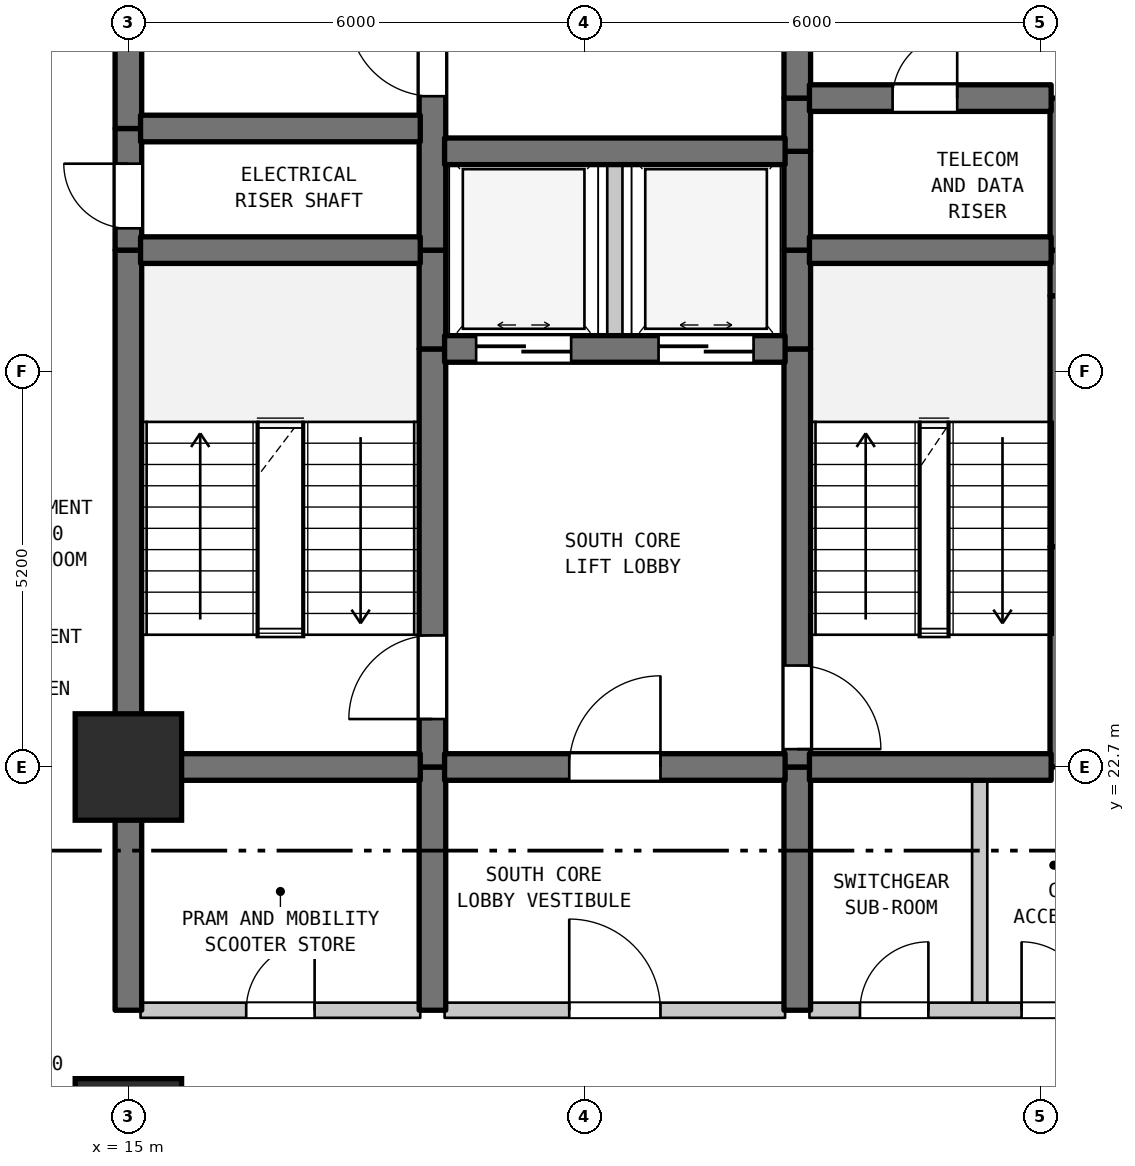
"""IFC4 building model, lengths in metres.
Left out: names, types, materials, properties, quantities, classifications, styles, units other than length and angle.
Written with IfcOpenShell. Run it as: python <this file> out.ifc"""

import sys

from ifc_helpers import new_model, si_unit, direction, frame, frame_2d, origin, origin_2d, place, context, subcontext, project, spatial, rectangle, extrude, element, fill, save


model = new_model("IFC4")
c1 = context("Model", 3, precision=1e-05, world=origin(), true_north=direction((0.0, 1.0)))
c2 = subcontext(c1, "Body", "Model", "MODEL_VIEW")
j1 = project(units=[si_unit("LENGTHUNIT", "METRE"), si_unit("PLANEANGLEUNIT", "RADIAN")], contexts=[c1])
p1 = place(None, origin())
s1 = spatial("IfcSite", under=j1, at=p1, CompositionType="ELEMENT")
p2 = place(p1, origin())
s2 = spatial("IfcBuilding", under=s1, at=p2, CompositionType="ELEMENT")
p3 = place(p2, frame((0.0, 0.0, 49.9)))
s3 = spatial("IfcBuildingStorey", under=s2, at=p3, CompositionType="ELEMENT", Elevation=49.9)
for number, where, z_axis, x_axis in (
    (1, (15.0, 17.9, 0.0), (0.0, 0.0, 1.0), (1.0, 0.0, 0.0)),
    (2, (15.0, 22.7, 0.0), (0.0, 0.0, 1.0), (1.0, 0.0, 0.0)),
):
    element("IfcColumn", number, at=place(p3, frame(where, z_axis=z_axis, x_axis=x_axis)), inside=s3, PredefinedType="COLUMN", context=c2, shape_type="SweptSolid", body=[
        extrude(rectangle(XDim=1.4, YDim=1.4, at=origin_2d()), origin(), (0.0, 0.0, 1.0), 3.7),
    ])
p4 = place(p3, frame((15.0, 19.5, 0.0), z_axis=(0.0, 0.0, 1.0), x_axis=(0.0, 1.0, 0.0)))
e3 = element("IfcWall", 3, at=p4, inside=s3, PredefinedType="SHEAR", context=c2, shape_type="SweptSolid", body=[
    extrude(rectangle(XDim=3.2, YDim=0.35, at=frame_2d((1.6, 0.0))), origin(), (0.0, 0.0, 1.0), 3.385),
])
p5 = place(p3, frame((15.0, 22.7, 0.0), z_axis=(0.0, 0.0, 1.0), x_axis=(0.0, 1.0, 0.0)))
e4 = element("IfcWall", 4, at=p5, inside=s3, PredefinedType="SHEAR", context=c2, shape_type="SweptSolid", body=[
    extrude(rectangle(XDim=6.8, YDim=0.35, at=frame_2d((3.4, 0.0))), origin(), (0.0, 0.0, 1.0), 3.385),
])
p6 = place(p3, frame((15.0, 29.5, 0.0), z_axis=(0.0, 0.0, 1.0), x_axis=(0.0, 1.0, 0.0)))
e5 = element("IfcWall", 5, at=p6, inside=s3, PredefinedType="SHEAR", context=c2, shape_type="SweptSolid", body=[
    extrude(rectangle(XDim=1.6, YDim=0.35, at=frame_2d((0.8, 0.0))), origin(), (0.0, 0.0, 1.0), 3.385),
])
p7 = place(p6, frame((0.287, 0.0, 0.0)))
e6 = element("IfcOpeningElement", 6, at=p7, cuts=e5, PredefinedType="OPENING", context=c2, shape_type="SweptSolid", body=[
    extrude(rectangle(XDim=0.85, YDim=2.1, at=frame_2d((0.425, 1.05))), frame((0.0, 0.185, 0.0), z_axis=(0.0, -1.0, 0.0), x_axis=(1.0, 0.0, 0.0)), (0.0, 0.0, 1.0), 0.37),
])
p8 = place(p3, frame((15.0, 31.1, 0.0), z_axis=(0.0, 0.0, 1.0), x_axis=(0.0, 1.0, 0.0)))
e7 = element("IfcWall", 7, at=p8, inside=s3, PredefinedType="SHEAR", context=c2, shape_type="SweptSolid", body=[
    extrude(rectangle(XDim=6.8, YDim=0.35, at=frame_2d((3.4, 0.0))), origin(), (0.0, 0.0, 1.0), 3.385),
])
p9 = place(p3, frame((19.0, 19.5, 0.0), z_axis=(0.0, 0.0, 1.0), x_axis=(0.0, 1.0, 0.0)))
e8 = element("IfcWall", 8, at=p9, inside=s3, PredefinedType="SHEAR", context=c2, shape_type="SweptSolid", body=[
    extrude(rectangle(XDim=3.2, YDim=0.35, at=frame_2d((1.6, 0.0))), origin(), (0.0, 0.0, 1.0), 3.385),
])
p10 = place(p3, frame((19.0, 22.7, 0.0), z_axis=(0.0, 0.0, 1.0), x_axis=(0.0, 1.0, 0.0)))
e9 = element("IfcWall", 9, at=p10, inside=s3, PredefinedType="SHEAR", context=c2, shape_type="SweptSolid", body=[
    extrude(rectangle(XDim=5.5, YDim=0.35, at=frame_2d((2.75, 0.0))), origin(), (0.0, 0.0, 1.0), 3.385),
])
p11 = place(p10, frame((0.631, 0.0, 0.0)))
e10 = element("IfcOpeningElement", 10, at=p11, cuts=e9, PredefinedType="OPENING", context=c2, shape_type="SweptSolid", body=[
    extrude(rectangle(XDim=1.1, YDim=2.15, at=frame_2d((0.55, 1.075))), frame((0.0, 0.185, 0.0), z_axis=(0.0, -1.0, 0.0), x_axis=(1.0, 0.0, 0.0)), (0.0, 0.0, 1.0), 0.37),
])
p12 = place(p3, frame((19.0, 28.2, 0.0), z_axis=(0.0, 0.0, 1.0), x_axis=(0.0, 1.0, 0.0)))
e11 = element("IfcWall", 11, at=p12, inside=s3, PredefinedType="SHEAR", context=c2, shape_type="SweptSolid", body=[
    extrude(rectangle(XDim=1.3, YDim=0.35, at=frame_2d((0.65, 0.0))), origin(), (0.0, 0.0, 1.0), 3.385),
])
p13 = place(p3, frame((19.0, 29.5, 0.0), z_axis=(0.0, 0.0, 1.0), x_axis=(0.0, 1.0, 0.0)))
e12 = element("IfcWall", 12, at=p13, inside=s3, PredefinedType="SHEAR", context=c2, shape_type="SweptSolid", body=[
    extrude(rectangle(XDim=5.5, YDim=0.35, at=frame_2d((2.75, 0.0))), origin(), (0.0, 0.0, 1.0), 3.385),
])
p14 = place(p13, frame((2.025, 0.0, 0.0)))
e13 = element("IfcOpeningElement", 13, at=p14, cuts=e12, PredefinedType="OPENING", context=c2, shape_type="SweptSolid", body=[
    extrude(rectangle(XDim=1.1, YDim=2.15, at=frame_2d((0.55, 1.075))), frame((0.0, 0.185, 0.0), z_axis=(0.0, -1.0, 0.0), x_axis=(1.0, 0.0, 0.0)), (0.0, 0.0, 1.0), 0.37),
])
p15 = place(p3, frame((21.4, 28.2, 0.0), z_axis=(0.0, 0.0, 1.0), x_axis=(0.0, 1.0, 0.0)))
e14 = element("IfcWall", 14, at=p15, inside=s3, PredefinedType="STANDARD", context=c2, shape_type="SweptSolid", body=[
    extrude(rectangle(XDim=2.6, YDim=0.2, at=frame_2d((1.3, 0.0))), origin(), (0.0, 0.0, 1.0), 3.385),
])
p16 = place(p3, frame((23.8, 19.5, 0.0), z_axis=(0.0, 0.0, 1.0), x_axis=(0.0, 1.0, 0.0)))
e15 = element("IfcWall", 15, at=p16, inside=s3, PredefinedType="SHEAR", context=c2, shape_type="SweptSolid", body=[
    extrude(rectangle(XDim=3.2, YDim=0.35, at=frame_2d((1.6, 0.0))), origin(), (0.0, 0.0, 1.0), 3.385),
])
p17 = place(p3, frame((23.8, 22.7, 0.0), z_axis=(0.0, 0.0, 1.0), x_axis=(0.0, 1.0, 0.0)))
e16 = element("IfcWall", 16, at=p17, inside=s3, PredefinedType="SHEAR", context=c2, shape_type="SweptSolid", body=[
    extrude(rectangle(XDim=5.5, YDim=0.35, at=frame_2d((2.75, 0.0))), origin(), (0.0, 0.0, 1.0), 3.385),
])
p18 = place(p17, frame((0.235, 0.0, 0.0)))
e17 = element("IfcOpeningElement", 17, at=p18, cuts=e16, PredefinedType="OPENING", context=c2, shape_type="SweptSolid", body=[
    extrude(rectangle(XDim=1.1, YDim=2.15, at=frame_2d((0.55, 1.075))), frame((0.0, 0.185, 0.0), z_axis=(0.0, -1.0, 0.0), x_axis=(1.0, 0.0, 0.0)), (0.0, 0.0, 1.0), 0.37),
])
for number, where, z_axis, x_axis in (
    (18, (23.8, 28.2, 0.0), (0.0, 0.0, 1.0), (0.0, 1.0, 0.0)),
    (19, (23.8, 29.5, 0.0), (0.0, 0.0, 1.0), (0.0, 1.0, 0.0)),
):
    element("IfcWall", number, at=place(p3, frame(where, z_axis=z_axis, x_axis=x_axis)), inside=s3, PredefinedType="SHEAR", context=c2, shape_type="SweptSolid", body=[
        extrude(rectangle(XDim=1.3, YDim=0.35, at=frame_2d((0.65, 0.0))), origin(), (0.0, 0.0, 1.0), 3.385),
    ])
p19 = place(p3, frame((23.8, 30.8, 0.0), z_axis=(0.0, 0.0, 1.0), x_axis=(0.0, 1.0, 0.0)))
e20 = element("IfcWall", 20, at=p19, inside=s3, PredefinedType="SHEAR", context=c2, shape_type="SweptSolid", body=[
    extrude(rectangle(XDim=0.7, YDim=0.35, at=frame_2d((0.35, 0.0))), origin(), (0.0, 0.0, 1.0), 3.385),
])
p20 = place(p3, frame((23.8, 31.5, 0.0), z_axis=(0.0, 0.0, 1.0), x_axis=(0.0, 1.0, 0.0)))
e21 = element("IfcWall", 21, at=p20, inside=s3, PredefinedType="SHEAR", context=c2, shape_type="SweptSolid", body=[
    extrude(rectangle(XDim=3.5, YDim=0.35, at=frame_2d((1.75, 0.0))), origin(), (0.0, 0.0, 1.0), 3.385),
])
p21 = place(p20, frame((1.127, 0.0, 0.0)))
e22 = element("IfcOpeningElement", 22, at=p21, cuts=e21, PredefinedType="OPENING", context=c2, shape_type="SweptSolid", body=[
    extrude(rectangle(XDim=1.1, YDim=2.15, at=frame_2d((0.55, 1.075))), frame((0.0, 0.185, 0.0), z_axis=(0.0, -1.0, 0.0), x_axis=(1.0, 0.0, 0.0)), (0.0, 0.0, 1.0), 0.37),
])
p22 = place(p3, frame((26.2, 19.5, 0.0), z_axis=(0.0, 0.0, 1.0), x_axis=(0.0, 1.0, 0.0)))
e23 = element("IfcWall", 23, at=p22, inside=s3, PredefinedType="STANDARD", context=c2, shape_type="SweptSolid", body=[
    extrude(rectangle(XDim=3.2, YDim=0.2, at=frame_2d((1.6, 0.0))), origin(), (0.0, 0.0, 1.0), 3.385),
])
p23 = place(p3, frame((27.3, 22.7, 0.0), z_axis=(0.0, 0.0, 1.0), x_axis=(0.0, 1.0, 0.0)))
e24 = element("IfcWall", 24, at=p23, inside=s3, PredefinedType="SHEAR", context=c2, shape_type="SweptSolid", body=[
    extrude(rectangle(XDim=2.9, YDim=0.35, at=frame_2d((1.45, 0.0))), origin(), (0.0, 0.0, 1.0), 3.385),
])
p24 = place(p3, frame((27.3, 25.6, 0.0), z_axis=(0.0, 0.0, 1.0), x_axis=(0.0, 1.0, 0.0)))
e25 = element("IfcWall", 25, at=p24, inside=s3, PredefinedType="SHEAR", context=c2, shape_type="SweptSolid", body=[
    extrude(rectangle(XDim=3.3, YDim=0.35, at=frame_2d((1.65, 0.0))), origin(), (0.0, 0.0, 1.0), 3.385),
])
p25 = place(p3, frame((27.3, 28.9, 0.0), z_axis=(0.0, 0.0, 1.0), x_axis=(0.0, 1.0, 0.0)))
e26 = element("IfcWall", 26, at=p25, inside=s3, PredefinedType="SHEAR", context=c2, shape_type="SweptSolid", body=[
    extrude(rectangle(XDim=0.6, YDim=0.35, at=frame_2d((0.3, 0.0))), origin(), (0.0, 0.0, 1.0), 3.385),
])
p26 = place(p3, frame((27.3, 29.5, 0.0), z_axis=(0.0, 0.0, 1.0), x_axis=(0.0, 1.0, 0.0)))
e27 = element("IfcWall", 27, at=p26, inside=s3, PredefinedType="SHEAR", context=c2, shape_type="SweptSolid", body=[
    extrude(rectangle(XDim=2.0, YDim=0.35, at=frame_2d((1.0, 0.0))), origin(), (0.0, 0.0, 1.0), 3.385),
])
p27 = place(p3, frame((15.16, 19.5, 0.0), z_axis=(0.0, 0.0, 1.0), x_axis=(1.0, 0.0, 0.0)))
e28 = element("IfcWall", 28, at=p27, inside=s3, PredefinedType="STANDARD", context=c2, shape_type="SweptSolid", body=[
    extrude(rectangle(XDim=3.68, YDim=0.2, at=frame_2d((1.84, 0.0))), origin(), (0.0, 0.0, 1.0), 3.385),
])
p28 = place(p27, frame((1.39, 0.0, 0.0)))
e29 = element("IfcOpeningElement", 29, at=p28, cuts=e28, PredefinedType="OPENING", context=c2, shape_type="SweptSolid", body=[
    extrude(rectangle(XDim=0.9, YDim=2.15, at=frame_2d((0.45, 1.075))), frame((0.0, 0.11, 0.0), z_axis=(0.0, -1.0, 0.0), x_axis=(1.0, 0.0, 0.0)), (0.0, 0.0, 1.0), 0.22),
])
p29 = place(p3, frame((19.16, 19.5, 0.0), z_axis=(0.0, 0.0, 1.0), x_axis=(1.0, 0.0, 0.0)))
e30 = element("IfcWall", 30, at=p29, inside=s3, PredefinedType="STANDARD", context=c2, shape_type="SweptSolid", body=[
    extrude(rectangle(XDim=4.48, YDim=0.2, at=frame_2d((2.24, 0.0))), origin(), (0.0, 0.0, 1.0), 3.385),
])
p30 = place(p29, frame((1.64, 0.0, 0.0)))
e31 = element("IfcOpeningElement", 31, at=p30, cuts=e30, PredefinedType="OPENING", context=c2, shape_type="SweptSolid", body=[
    extrude(rectangle(XDim=1.2, YDim=2.2, at=frame_2d((0.6, 1.1))), frame((0.0, 0.11, 0.0), z_axis=(0.0, -1.0, 0.0), x_axis=(1.0, 0.0, 0.0)), (0.0, 0.0, 1.0), 0.22),
])
p31 = place(p3, frame((23.96, 19.5, 0.0), z_axis=(0.0, 0.0, 1.0), x_axis=(1.0, 0.0, 0.0)))
e32 = element("IfcWall", 32, at=p31, inside=s3, PredefinedType="STANDARD", context=c2, shape_type="SweptSolid", body=[
    extrude(rectangle(XDim=4.455, YDim=0.2, at=frame_2d((2.228, 0.0))), origin(), (0.0, 0.0, 1.0), 3.385),
])
p32 = place(p31, frame((0.665, 0.0, 0.0)))
e33 = element("IfcOpeningElement", 33, at=p32, cuts=e32, PredefinedType="OPENING", context=c2, shape_type="SweptSolid", body=[
    extrude(rectangle(XDim=0.9, YDim=2.15, at=frame_2d((0.45, 1.075))), frame((0.0, 0.11, 0.0), z_axis=(0.0, -1.0, 0.0), x_axis=(1.0, 0.0, 0.0)), (0.0, 0.0, 1.0), 0.22),
])
p33 = place(p31, frame((2.791, 0.0, 0.0)))
e34 = element("IfcOpeningElement", 34, at=p33, cuts=e32, PredefinedType="OPENING", context=c2, shape_type="SweptSolid", body=[
    extrude(rectangle(XDim=0.9, YDim=2.15, at=frame_2d((0.45, 1.075))), frame((0.0, 0.11, 0.0), z_axis=(0.0, -1.0, 0.0), x_axis=(1.0, 0.0, 0.0)), (0.0, 0.0, 1.0), 0.22),
])
p34 = place(p3, frame((15.16, 22.7, 0.0), z_axis=(0.0, 0.0, 1.0), x_axis=(1.0, 0.0, 0.0)))
e35 = element("IfcWall", 35, at=p34, inside=s3, PredefinedType="SHEAR", context=c2, shape_type="SweptSolid", body=[
    extrude(rectangle(XDim=3.68, YDim=0.35, at=frame_2d((1.84, 0.0))), origin(), (0.0, 0.0, 1.0), 3.385),
])
p35 = place(p3, frame((19.16, 22.7, 0.0), z_axis=(0.0, 0.0, 1.0), x_axis=(1.0, 0.0, 0.0)))
e36 = element("IfcWall", 36, at=p35, inside=s3, PredefinedType="SHEAR", context=c2, shape_type="SweptSolid", body=[
    extrude(rectangle(XDim=4.48, YDim=0.35, at=frame_2d((2.24, 0.0))), origin(), (0.0, 0.0, 1.0), 3.385),
])
p36 = place(p35, frame((1.64, 0.0, 0.0)))
e37 = element("IfcOpeningElement", 37, at=p36, cuts=e36, PredefinedType="OPENING", context=c2, shape_type="SweptSolid", body=[
    extrude(rectangle(XDim=1.2, YDim=2.2, at=frame_2d((0.6, 1.1))), frame((0.0, 0.185, 0.0), z_axis=(0.0, -1.0, 0.0), x_axis=(1.0, 0.0, 0.0)), (0.0, 0.0, 1.0), 0.37),
])
p37 = place(p3, frame((23.96, 22.7, 0.0), z_axis=(0.0, 0.0, 1.0), x_axis=(1.0, 0.0, 0.0)))
e38 = element("IfcWall", 38, at=p37, inside=s3, PredefinedType="SHEAR", context=c2, shape_type="SweptSolid", body=[
    extrude(rectangle(XDim=3.18, YDim=0.35, at=frame_2d((1.59, 0.0))), origin(), (0.0, 0.0, 1.0), 3.385),
])
p38 = place(p3, frame((19.16, 28.2, 0.0), z_axis=(0.0, 0.0, 1.0), x_axis=(1.0, 0.0, 0.0)))
e39 = element("IfcWall", 39, at=p38, inside=s3, PredefinedType="SHEAR", context=c2, shape_type="SweptSolid", body=[
    extrude(rectangle(XDim=4.48, YDim=0.35, at=frame_2d((2.24, 0.0))), origin(), (0.0, 0.0, 1.0), 3.385),
])
p39 = place(p38, frame((0.415, 0.0, 0.0)))
e40 = element("IfcOpeningElement", 40, at=p39, cuts=e39, PredefinedType="OPENING", context=c2, shape_type="SweptSolid", body=[
    extrude(rectangle(XDim=1.25, YDim=2.2, at=frame_2d((0.625, 1.1))), frame((0.0, 0.185, 0.0), z_axis=(0.0, -1.0, 0.0), x_axis=(1.0, 0.0, 0.0)), (0.0, 0.0, 1.0), 0.37),
])
p40 = place(p38, frame((2.815, 0.0, 0.0)))
e41 = element("IfcOpeningElement", 41, at=p40, cuts=e39, PredefinedType="OPENING", context=c2, shape_type="SweptSolid", body=[
    extrude(rectangle(XDim=1.25, YDim=2.2, at=frame_2d((0.625, 1.1))), frame((0.0, 0.185, 0.0), z_axis=(0.0, -1.0, 0.0), x_axis=(1.0, 0.0, 0.0)), (0.0, 0.0, 1.0), 0.37),
])
p41 = place(p3, frame((15.16, 29.5, 0.0), z_axis=(0.0, 0.0, 1.0), x_axis=(1.0, 0.0, 0.0)))
e42 = element("IfcWall", 42, at=p41, inside=s3, PredefinedType="SHEAR", context=c2, shape_type="SweptSolid", body=[
    extrude(rectangle(XDim=3.68, YDim=0.35, at=frame_2d((1.84, 0.0))), origin(), (0.0, 0.0, 1.0), 3.385),
])
p42 = place(p3, frame((23.96, 29.5, 0.0), z_axis=(0.0, 0.0, 1.0), x_axis=(1.0, 0.0, 0.0)))
e43 = element("IfcWall", 43, at=p42, inside=s3, PredefinedType="SHEAR", context=c2, shape_type="SweptSolid", body=[
    extrude(rectangle(XDim=3.18, YDim=0.35, at=frame_2d((1.59, 0.0))), origin(), (0.0, 0.0, 1.0), 3.385),
])
p43 = place(p3, frame((19.16, 30.8, 0.0), z_axis=(0.0, 0.0, 1.0), x_axis=(1.0, 0.0, 0.0)))
e44 = element("IfcWall", 44, at=p43, inside=s3, PredefinedType="SHEAR", context=c2, shape_type="SweptSolid", body=[
    extrude(rectangle(XDim=4.48, YDim=0.35, at=frame_2d((2.24, 0.0))), origin(), (0.0, 0.0, 1.0), 3.385),
])
p44 = place(p3, frame((15.16, 31.1, 0.0), z_axis=(0.0, 0.0, 1.0), x_axis=(1.0, 0.0, 0.0)))
e45 = element("IfcWall", 45, at=p44, inside=s3, PredefinedType="SHEAR", context=c2, shape_type="SweptSolid", body=[
    extrude(rectangle(XDim=3.68, YDim=0.35, at=frame_2d((1.84, 0.0))), origin(), (0.0, 0.0, 1.0), 3.385),
])
p45 = place(p3, frame((23.96, 31.5, 0.0), z_axis=(0.0, 0.0, 1.0), x_axis=(1.0, 0.0, 0.0)))
e46 = element("IfcWall", 46, at=p45, inside=s3, PredefinedType="SHEAR", context=c2, shape_type="SweptSolid", body=[
    extrude(rectangle(XDim=3.18, YDim=0.35, at=frame_2d((1.59, 0.0))), origin(), (0.0, 0.0, 1.0), 3.385),
])
p46 = place(p45, frame((1.094, 0.0, 0.0)))
e47 = element("IfcOpeningElement", 47, at=p46, cuts=e46, PredefinedType="OPENING", context=c2, shape_type="SweptSolid", body=[
    extrude(rectangle(XDim=0.85, YDim=2.1, at=frame_2d((0.425, 1.05))), frame((0.0, 0.185, 0.0), z_axis=(0.0, -1.0, 0.0), x_axis=(1.0, 0.0, 0.0)), (0.0, 0.0, 1.0), 0.37),
])
p47 = place(p7, origin())
e48 = element("IfcDoor", 48, at=p47, inside=s3, OperationType="SINGLE_SWING_RIGHT", PredefinedType="DOOR", context=c2, shape_type="SweptSolid", body=[
    extrude(rectangle(XDim=0.85, YDim=2.1, at=frame_2d((0.425, 1.05))), frame((0.0, 0.025, 0.0), z_axis=(0.0, -1.0, 0.0), x_axis=(1.0, 0.0, 0.0)), (0.0, 0.0, 1.0), 0.05),
])
fill(e6, e48)
p48 = place(p11, origin())
e49 = element("IfcDoor", 49, at=p48, inside=s3, OperationType="SINGLE_SWING_LEFT", PredefinedType="DOOR", context=c2, shape_type="SweptSolid", body=[
    extrude(rectangle(XDim=1.1, YDim=2.15, at=frame_2d((0.55, 1.075))), frame((0.0, 0.025, 0.0), z_axis=(0.0, -1.0, 0.0), x_axis=(1.0, 0.0, 0.0)), (0.0, 0.0, 1.0), 0.05),
])
fill(e10, e49)
p49 = place(p14, origin())
e50 = element("IfcDoor", 50, at=p49, inside=s3, OperationType="SINGLE_SWING_RIGHT", PredefinedType="DOOR", context=c2, shape_type="SweptSolid", body=[
    extrude(rectangle(XDim=1.1, YDim=2.15, at=frame_2d((0.55, 1.075))), frame((0.0, 0.025, 0.0), z_axis=(0.0, -1.0, 0.0), x_axis=(1.0, 0.0, 0.0)), (0.0, 0.0, 1.0), 0.05),
])
fill(e13, e50)
p50 = place(p18, frame((1.1, 0.0, 0.0), z_axis=(0.0, 0.0, 1.0), x_axis=(-1.0, 0.0, 0.0)))
e51 = element("IfcDoor", 51, at=p50, inside=s3, OperationType="SINGLE_SWING_LEFT", PredefinedType="DOOR", context=c2, shape_type="SweptSolid", body=[
    extrude(rectangle(XDim=1.1, YDim=2.15, at=frame_2d((0.55, 1.075))), frame((0.0, 0.025, 0.0), z_axis=(0.0, -1.0, 0.0), x_axis=(1.0, 0.0, 0.0)), (0.0, 0.0, 1.0), 0.05),
])
fill(e17, e51)
p51 = place(p28, origin())
e52 = element("IfcDoor", 52, at=p51, inside=s3, OperationType="SINGLE_SWING_RIGHT", PredefinedType="DOOR", context=c2, shape_type="SweptSolid", body=[
    extrude(rectangle(XDim=0.9, YDim=2.15, at=frame_2d((0.45, 1.075))), frame((0.0, 0.025, 0.0), z_axis=(0.0, -1.0, 0.0), x_axis=(1.0, 0.0, 0.0)), (0.0, 0.0, 1.0), 0.05),
])
fill(e29, e52)
p52 = place(p30, origin())
e53 = element("IfcDoor", 53, at=p52, inside=s3, OperationType="SINGLE_SWING_LEFT", PredefinedType="DOOR", context=c2, shape_type="SweptSolid", body=[
    extrude(rectangle(XDim=1.2, YDim=2.2, at=frame_2d((0.6, 1.1))), frame((0.0, 0.025, 0.0), z_axis=(0.0, -1.0, 0.0), x_axis=(1.0, 0.0, 0.0)), (0.0, 0.0, 1.0), 0.05),
])
fill(e31, e53)
p53 = place(p32, origin())
e54 = element("IfcDoor", 54, at=p53, inside=s3, OperationType="SINGLE_SWING_RIGHT", PredefinedType="DOOR", context=c2, shape_type="SweptSolid", body=[
    extrude(rectangle(XDim=0.9, YDim=2.15, at=frame_2d((0.45, 1.075))), frame((0.0, 0.025, 0.0), z_axis=(0.0, -1.0, 0.0), x_axis=(1.0, 0.0, 0.0)), (0.0, 0.0, 1.0), 0.05),
])
fill(e33, e54)
p54 = place(p33, origin())
e55 = element("IfcDoor", 55, at=p54, inside=s3, OperationType="SINGLE_SWING_LEFT", PredefinedType="DOOR", context=c2, shape_type="SweptSolid", body=[
    extrude(rectangle(XDim=0.9, YDim=2.15, at=frame_2d((0.45, 1.075))), frame((0.0, 0.025, 0.0), z_axis=(0.0, -1.0, 0.0), x_axis=(1.0, 0.0, 0.0)), (0.0, 0.0, 1.0), 0.05),
])
fill(e34, e55)
p55 = place(p36, origin())
e56 = element("IfcDoor", 56, at=p55, inside=s3, OperationType="SINGLE_SWING_RIGHT", PredefinedType="DOOR", context=c2, shape_type="SweptSolid", body=[
    extrude(rectangle(XDim=1.2, YDim=2.2, at=frame_2d((0.6, 1.1))), frame((0.0, 0.025, 0.0), z_axis=(0.0, -1.0, 0.0), x_axis=(1.0, 0.0, 0.0)), (0.0, 0.0, 1.0), 0.05),
])
fill(e37, e56)
p56 = place(p39, origin())
e57 = element("IfcDoor", 57, at=p56, inside=s3, OperationType="DOUBLE_DOOR_SLIDING", PredefinedType="DOOR", context=c2, shape_type="SweptSolid", body=[
    extrude(rectangle(XDim=1.25, YDim=2.2, at=frame_2d((0.625, 1.1))), frame((0.0, 0.025, 0.0), z_axis=(0.0, -1.0, 0.0), x_axis=(1.0, 0.0, 0.0)), (0.0, 0.0, 1.0), 0.05),
])
fill(e40, e57)
p57 = place(p40, origin())
e58 = element("IfcDoor", 58, at=p57, inside=s3, OperationType="DOUBLE_DOOR_SLIDING", PredefinedType="DOOR", context=c2, shape_type="SweptSolid", body=[
    extrude(rectangle(XDim=1.25, YDim=2.2, at=frame_2d((0.625, 1.1))), frame((0.0, 0.025, 0.0), z_axis=(0.0, -1.0, 0.0), x_axis=(1.0, 0.0, 0.0)), (0.0, 0.0, 1.0), 0.05),
])
fill(e41, e58)
p58 = place(p46, origin())
e59 = element("IfcDoor", 59, at=p58, inside=s3, OperationType="SINGLE_SWING_RIGHT", PredefinedType="DOOR", context=c2, shape_type="SweptSolid", body=[
    extrude(rectangle(XDim=0.85, YDim=2.1, at=frame_2d((0.425, 1.05))), frame((0.0, 0.025, 0.0), z_axis=(0.0, -1.0, 0.0), x_axis=(1.0, 0.0, 0.0)), (0.0, 0.0, 1.0), 0.05),
])
fill(e47, e59)
save(model, sys.argv[1])
